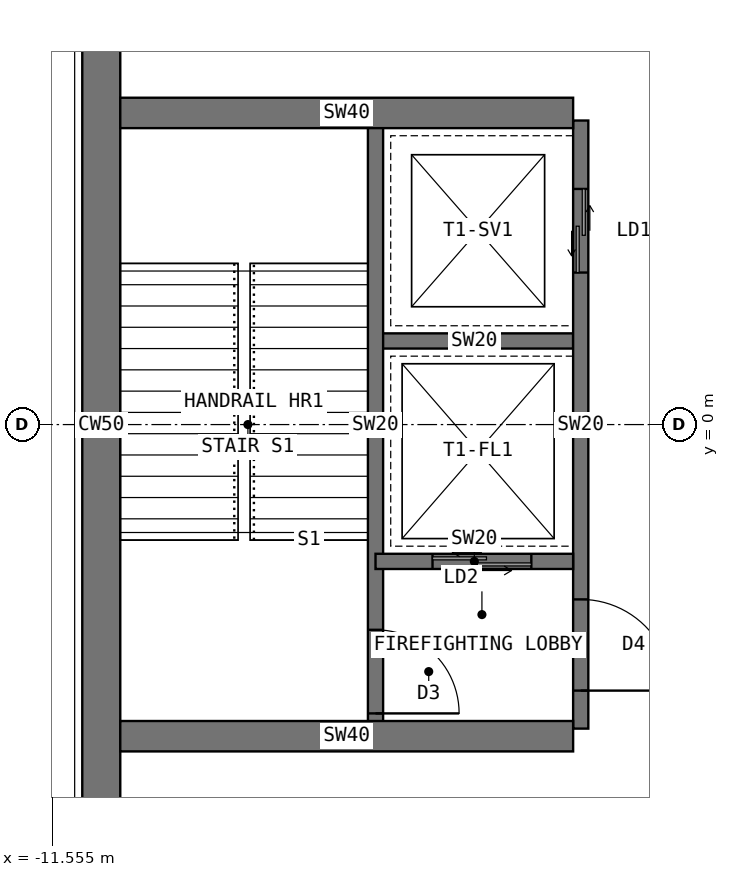
"""IFC4 building model, lengths in metres.
Left out: names, types, materials, properties, quantities, classifications, styles, units other than length and angle.
Written with IfcOpenShell. Run it as: python <this file> out.ifc"""

import sys

from ifc_helpers import new_model, si_unit, direction, frame, frame_2d, origin, place, context, subcontext, project, spatial, rectangle, extrude, element, fill, save


model = new_model("IFC4")
c1 = context("Model", 3, precision=1e-05, world=origin(), true_north=direction((0.0, 1.0)))
c2 = subcontext(c1, "Body", "Model", "MODEL_VIEW")
j1 = project(units=[si_unit("LENGTHUNIT", "METRE"), si_unit("PLANEANGLEUNIT", "RADIAN")], contexts=[c1])
p1 = place(None, origin())
s1 = spatial("IfcSite", under=j1, at=p1, CompositionType="ELEMENT")
p2 = place(p1, origin())
s2 = spatial("IfcBuilding", under=s1, at=p2, CompositionType="ELEMENT")
p3 = place(p2, frame((0.0, 0.0, 238.5)))
s3 = spatial("IfcBuildingStorey", under=s2, at=p3, CompositionType="ELEMENT", Elevation=238.5)
p4 = place(p3, frame((-10.908, 6.298, 0.0), z_axis=(0.0, 0.0, 1.0), x_axis=(0.0, -1.0, 0.0)))
e1 = element("IfcWall", 1, at=p4, inside=s3, PredefinedType="SHEAR", context=c2, shape_type="SweptSolid", body=[
    extrude(rectangle(XDim=12.596, YDim=0.5, at=frame_2d((6.298, 0.0))), origin(), (0.0, 0.0, 1.0), 5.0),
])
p5 = place(p3, frame((-4.6, 4.0, 0.0), z_axis=(0.0, 0.0, 1.0), x_axis=(0.0, -1.0, 0.0)))
e2 = element("IfcWall", 2, at=p5, inside=s3, PredefinedType="SHEAR", context=c2, shape_type="SweptSolid", body=[
    extrude(rectangle(XDim=8.0, YDim=0.2, at=frame_2d((4.0, 0.0))), origin(), (0.0, 0.0, 1.0), 5.0),
])
p6 = place(p5, frame((6.3, 0.0, 0.0)))
e3 = element("IfcOpeningElement", 3, at=p6, cuts=e2, PredefinedType="OPENING", context=c2, shape_type="SweptSolid", body=[
    extrude(rectangle(XDim=1.2, YDim=2.1, at=frame_2d((0.6, 1.05))), frame((0.0, 0.11, 0.0), z_axis=(0.0, -1.0, 0.0), x_axis=(1.0, 0.0, 0.0)), (0.0, 0.0, 1.0), 0.22),
])
p7 = place(p5, frame((0.9, 0.0, 0.0)))
e4 = element("IfcOpeningElement", 4, at=p7, cuts=e2, PredefinedType="OPENING", context=c2, shape_type="SweptSolid", body=[
    extrude(rectangle(XDim=1.1, YDim=2.2, at=frame_2d((0.55, 1.1))), frame((0.0, 0.11, 0.0), z_axis=(0.0, -1.0, 0.0), x_axis=(1.0, 0.0, 0.0)), (0.0, 0.0, 1.0), 0.22),
])
p8 = place(p3, frame((-4.7, 1.1, 0.0), z_axis=(0.0, 0.0, 1.0), x_axis=(-1.0, 0.0, 0.0)))
e5 = element("IfcWall", 5, at=p8, inside=s3, PredefinedType="SHEAR", context=c2, shape_type="SweptSolid", body=[
    extrude(rectangle(XDim=2.6, YDim=0.2, at=frame_2d((1.3, 0.0))), origin(), (0.0, 0.0, 1.0), 5.0),
])
p9 = place(p3, frame((-4.7, -1.8, 0.0), z_axis=(0.0, 0.0, 1.0), x_axis=(-1.0, 0.0, 0.0)))
e6 = element("IfcWall", 6, at=p9, inside=s3, PredefinedType="SHEAR", context=c2, shape_type="SweptSolid", body=[
    extrude(rectangle(XDim=2.6, YDim=0.2, at=frame_2d((1.3, 0.0))), origin(), (0.0, 0.0, 1.0), 5.0),
])
p10 = place(p9, frame((0.55, 0.0, 0.0)))
e7 = element("IfcOpeningElement", 7, at=p10, cuts=e6, PredefinedType="OPENING", context=c2, shape_type="SweptSolid", body=[
    extrude(rectangle(XDim=1.3, YDim=2.2, at=frame_2d((0.65, 1.1))), frame((0.0, 0.11, 0.0), z_axis=(0.0, -1.0, 0.0), x_axis=(1.0, 0.0, 0.0)), (0.0, 0.0, 1.0), 0.22),
])
p11 = place(p3, frame((-7.3, 4.0, 0.0), z_axis=(0.0, 0.0, 1.0), x_axis=(0.0, -1.0, 0.0)))
e8 = element("IfcWall", 8, at=p11, inside=s3, PredefinedType="SHEAR", context=c2, shape_type="SweptSolid", body=[
    extrude(rectangle(XDim=8.0, YDim=0.2, at=frame_2d((4.0, 0.0))), origin(), (0.0, 0.0, 1.0), 5.0),
])
p12 = place(p11, frame((6.7, 0.0, 0.0)))
e9 = element("IfcOpeningElement", 9, at=p12, cuts=e8, PredefinedType="OPENING", context=c2, shape_type="SweptSolid", body=[
    extrude(rectangle(XDim=1.1, YDim=2.1, at=frame_2d((0.55, 1.05))), frame((0.0, 0.11, 0.0), z_axis=(0.0, -1.0, 0.0), x_axis=(1.0, 0.0, 0.0)), (0.0, 0.0, 1.0), 0.22),
])
for number, where, z_axis, x_axis in (
    (10, (-4.7, -4.1, 0.0), (0.0, 0.0, 1.0), (-1.0, 0.0, 0.0)),
    (11, (-4.7, 4.1, 0.0), (0.0, 0.0, 1.0), (-1.0, 0.0, 0.0)),
):
    element("IfcWall", number, at=place(p3, frame(where, z_axis=z_axis, x_axis=x_axis)), inside=s3, PredefinedType="SHEAR", context=c2, shape_type="SweptSolid", body=[
        extrude(rectangle(XDim=5.958, YDim=0.4, at=frame_2d((2.979, 0.0))), origin(), (0.0, 0.0, 1.0), 5.0),
    ])
p13 = place(p6, origin())
e12 = element("IfcDoor", 12, at=p13, inside=s3, OperationType="SINGLE_SWING_RIGHT", PredefinedType="DOOR", context=c2, shape_type="SweptSolid", body=[
    extrude(rectangle(XDim=1.2, YDim=2.1, at=frame_2d((0.6, 1.05))), frame((0.0, 0.025, 0.0), z_axis=(0.0, -1.0, 0.0), x_axis=(1.0, 0.0, 0.0)), (0.0, 0.0, 1.0), 0.05),
])
fill(e3, e12)
p14 = place(p10, origin())
e13 = element("IfcDoor", 13, at=p14, inside=s3, OperationType="DOUBLE_DOOR_SLIDING", PredefinedType="DOOR", context=c2, shape_type="SweptSolid", body=[
    extrude(rectangle(XDim=1.3, YDim=2.2, at=frame_2d((0.65, 1.1))), frame((0.0, 0.025, 0.0), z_axis=(0.0, -1.0, 0.0), x_axis=(1.0, 0.0, 0.0)), (0.0, 0.0, 1.0), 0.05),
])
fill(e7, e13)
p15 = place(p7, origin())
e14 = element("IfcDoor", 14, at=p15, inside=s3, OperationType="DOUBLE_DOOR_SLIDING", PredefinedType="DOOR", context=c2, shape_type="SweptSolid", body=[
    extrude(rectangle(XDim=1.1, YDim=2.2, at=frame_2d((0.55, 1.1))), frame((0.0, 0.025, 0.0), z_axis=(0.0, -1.0, 0.0), x_axis=(1.0, 0.0, 0.0)), (0.0, 0.0, 1.0), 0.05),
])
fill(e4, e14)
p16 = place(p12, origin())
e15 = element("IfcDoor", 15, at=p16, inside=s3, OperationType="SINGLE_SWING_RIGHT", PredefinedType="DOOR", context=c2, shape_type="SweptSolid", body=[
    extrude(rectangle(XDim=1.1, YDim=2.1, at=frame_2d((0.55, 1.05))), frame((0.0, 0.025, 0.0), z_axis=(0.0, -1.0, 0.0), x_axis=(1.0, 0.0, 0.0)), (0.0, 0.0, 1.0), 0.05),
])
fill(e9, e15)
save(model, sys.argv[1])
